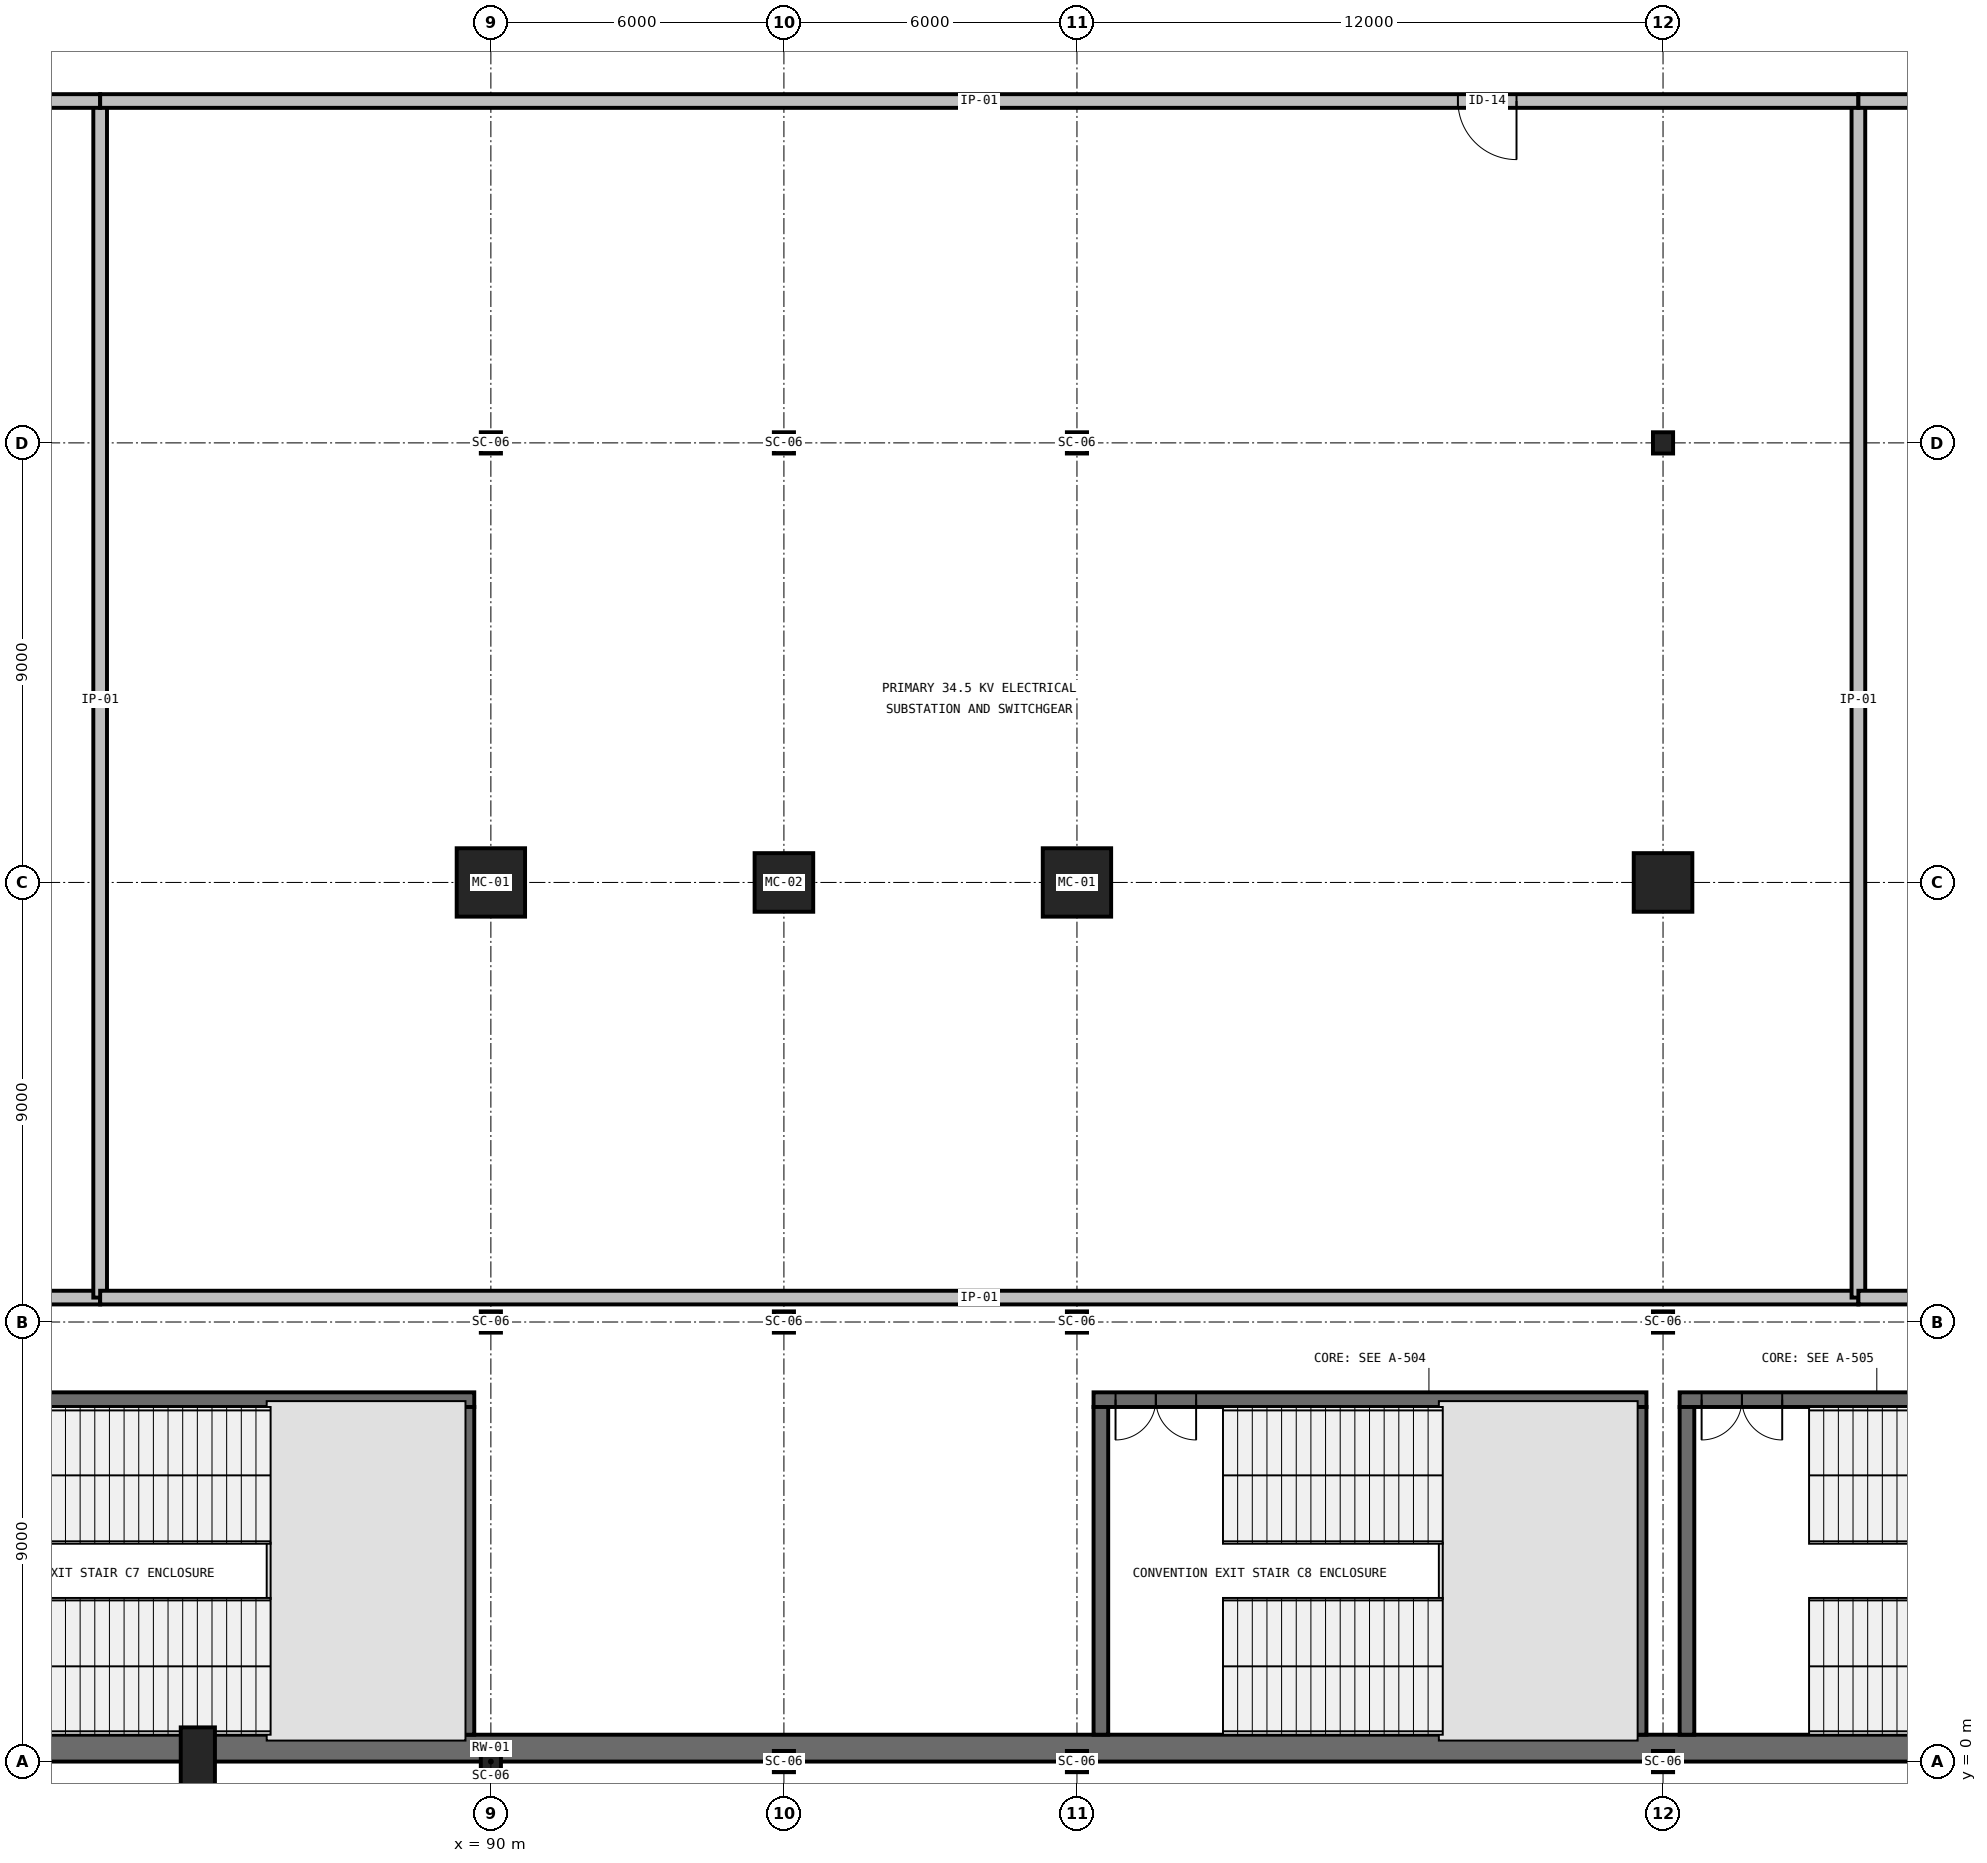
"""IFC4 building model, lengths in metres.
Left out: names, types, materials, properties, quantities, classifications, styles, units other than length and angle.
Written with IfcOpenShell. Run it as: python <this file> out.ifc"""

import sys

from ifc_helpers import new_model, si_unit, direction, frame, frame_2d, origin, origin_2d, place, context, subcontext, project, spatial, rectangle, i_section, extrude, element, fill, save


model = new_model("IFC4")
c1 = context("Model", 3, precision=1e-05, world=origin(), true_north=direction((0.0, 1.0)))
c2 = subcontext(c1, "Body", "Model", "MODEL_VIEW")
j1 = project(units=[si_unit("LENGTHUNIT", "METRE"), si_unit("PLANEANGLEUNIT", "RADIAN")], contexts=[c1])
p1 = place(None, origin())
s1 = spatial("IfcSite", under=j1, at=p1, CompositionType="ELEMENT")
p2 = place(p1, origin())
s2 = spatial("IfcBuilding", under=s1, at=p2, CompositionType="ELEMENT")
p3 = place(p2, frame((0.0, 0.0, -5.4)))
s3 = spatial("IfcBuildingStorey", under=s2, at=p3, CompositionType="ELEMENT", Elevation=-5.4)
for number, where, z_axis, x_axis in (
    (1, (90.0, 0.0, 0.0), (0.0, 0.0, 1.0), (1.0, 0.0, 0.0)),
    (2, (90.0, 9.0, 0.0), (0.0, 0.0, 1.0), (1.0, 0.0, 0.0)),
):
    element("IfcColumn", number, at=place(p3, frame(where, z_axis=z_axis, x_axis=x_axis)), inside=s3, PredefinedType="COLUMN", context=c2, shape_type="SweptSolid", body=[
        extrude(i_section(OverallWidth=0.412, OverallDepth=0.435, WebThickness=0.036, FlangeThickness=0.057, FilletRadius=0.031, at=origin_2d()), origin(), (0.0, 0.0, 1.0), 5.4),
    ])
p4 = place(p3, frame((90.0, 18.0, 0.0), z_axis=(0.0, 0.0, 1.0), x_axis=(1.0, 0.0, 0.0)))
e3 = element("IfcColumn", 3, at=p4, inside=s3, PredefinedType="COLUMN", context=c2, shape_type="SweptSolid", body=[
    extrude(rectangle(XDim=1.4, YDim=1.4, at=origin_2d()), origin(), (0.0, 0.0, 1.0), 5.4),
])
for number, where, z_axis, x_axis in (
    (4, (90.0, 27.0, 0.0), (0.0, 0.0, 1.0), (1.0, 0.0, 0.0)),
    (5, (96.0, 0.0, 0.0), (0.0, 0.0, 1.0), (1.0, 0.0, 0.0)),
    (6, (96.0, 9.0, 0.0), (0.0, 0.0, 1.0), (1.0, 0.0, 0.0)),
):
    element("IfcColumn", number, at=place(p3, frame(where, z_axis=z_axis, x_axis=x_axis)), inside=s3, PredefinedType="COLUMN", context=c2, shape_type="SweptSolid", body=[
        extrude(i_section(OverallWidth=0.412, OverallDepth=0.435, WebThickness=0.036, FlangeThickness=0.057, FilletRadius=0.031, at=origin_2d()), origin(), (0.0, 0.0, 1.0), 5.4),
    ])
p5 = place(p3, frame((96.0, 18.0, 0.0), z_axis=(0.0, 0.0, 1.0), x_axis=(1.0, 0.0, 0.0)))
e7 = element("IfcColumn", 7, at=p5, inside=s3, PredefinedType="COLUMN", context=c2, shape_type="SweptSolid", body=[
    extrude(rectangle(XDim=1.2, YDim=1.2, at=origin_2d()), origin(), (0.0, 0.0, 1.0), 5.4),
])
for number, where, z_axis, x_axis in (
    (8, (96.0, 27.0, 0.0), (0.0, 0.0, 1.0), (1.0, 0.0, 0.0)),
    (9, (102.0, 0.0, 0.0), (0.0, 0.0, 1.0), (1.0, 0.0, 0.0)),
    (10, (102.0, 9.0, 0.0), (0.0, 0.0, 1.0), (1.0, 0.0, 0.0)),
):
    element("IfcColumn", number, at=place(p3, frame(where, z_axis=z_axis, x_axis=x_axis)), inside=s3, PredefinedType="COLUMN", context=c2, shape_type="SweptSolid", body=[
        extrude(i_section(OverallWidth=0.412, OverallDepth=0.435, WebThickness=0.036, FlangeThickness=0.057, FilletRadius=0.031, at=origin_2d()), origin(), (0.0, 0.0, 1.0), 5.4),
    ])
p6 = place(p3, frame((102.0, 18.0, 0.0), z_axis=(0.0, 0.0, 1.0), x_axis=(1.0, 0.0, 0.0)))
e11 = element("IfcColumn", 11, at=p6, inside=s3, PredefinedType="COLUMN", context=c2, shape_type="SweptSolid", body=[
    extrude(rectangle(XDim=1.4, YDim=1.4, at=origin_2d()), origin(), (0.0, 0.0, 1.0), 5.4),
])
for number, where, z_axis, x_axis in (
    (12, (102.0, 27.0, 0.0), (0.0, 0.0, 1.0), (1.0, 0.0, 0.0)),
    (13, (114.0, 0.0, 0.0), (0.0, 0.0, 1.0), (1.0, 0.0, 0.0)),
    (14, (114.0, 9.0, 0.0), (0.0, 0.0, 1.0), (1.0, 0.0, 0.0)),
):
    element("IfcColumn", number, at=place(p3, frame(where, z_axis=z_axis, x_axis=x_axis)), inside=s3, PredefinedType="COLUMN", context=c2, shape_type="SweptSolid", body=[
        extrude(i_section(OverallWidth=0.412, OverallDepth=0.435, WebThickness=0.036, FlangeThickness=0.057, FilletRadius=0.031, at=origin_2d()), origin(), (0.0, 0.0, 1.0), 5.4),
    ])
p7 = place(p3, frame((114.0, 18.0, 0.0), z_axis=(0.0, 0.0, 1.0), x_axis=(1.0, 0.0, 0.0)))
e15 = element("IfcColumn", 15, at=p7, inside=s3, PredefinedType="COLUMN", context=c2, shape_type="SweptSolid", body=[
    extrude(rectangle(XDim=1.2, YDim=1.2, at=origin_2d()), origin(), (0.0, 0.0, 1.0), 5.4),
])
p8 = place(p3, frame((114.0, 27.0, 0.0), z_axis=(0.0, 0.0, 1.0), x_axis=(1.0, 0.0, 0.0)))
e16 = element("IfcColumn", 16, at=p8, inside=s3, PredefinedType="COLUMN", context=c2, shape_type="SweptSolid", body=[
    extrude(i_section(OverallWidth=0.412, OverallDepth=0.435, WebThickness=0.036, FlangeThickness=0.057, FilletRadius=0.031, at=origin_2d()), origin(), (0.0, 0.0, 1.0), 5.4),
])
p9 = place(p3, frame((84.0, 0.0, 0.0), z_axis=(0.0, 0.0, 1.0), x_axis=(1.0, 0.0, 0.0)))
e17 = element("IfcColumn", 17, at=p9, inside=s3, PredefinedType="PILASTER", context=c2, shape_type="SweptSolid", body=[
    extrude(rectangle(XDim=0.7, YDim=1.4, at=origin_2d()), origin(), (0.0, 0.0, 1.0), 5.4),
])
p10 = place(p3, frame((0.0, 0.275, 0.0), z_axis=(0.0, 0.0, 1.0), x_axis=(1.0, 0.0, 0.0)))
e18 = element("IfcWall", 18, at=p10, inside=s3, PredefinedType="SOLIDWALL", context=c2, shape_type="SweptSolid", body=[
    extrude(rectangle(XDim=174.0, YDim=0.55, at=frame_2d((87.0, 0.0))), origin(), (0.0, 0.0, 1.0), 5.02),
])
p11 = place(p3, frame((89.66, 7.41, 0.0), z_axis=(0.0, 0.0, 1.0), x_axis=(-1.0, 0.0, 0.0)))
e19 = element("IfcWall", 19, at=p11, inside=s3, PredefinedType="SHEAR", context=c2, shape_type="SweptSolid", body=[
    extrude(rectangle(XDim=11.32, YDim=0.3, at=frame_2d((5.66, 0.0))), origin(), (0.0, 0.0, 1.0), 5.4),
])
p12 = place(p11, frame((9.22, 0.0, 0.0)))
e20 = element("IfcOpeningElement", 20, at=p12, cuts=e19, PredefinedType="OPENING", context=c2, shape_type="SweptSolid", body=[
    extrude(rectangle(XDim=1.65, YDim=2.25, at=frame_2d((0.825, 1.125))), frame((0.0, 0.165, 0.0), z_axis=(0.0, -1.0, 0.0), x_axis=(1.0, 0.0, 0.0)), (0.0, 0.0, 1.0), 0.33),
])
p13 = place(p3, frame((89.51, 0.55, 0.0), z_axis=(0.0, 0.0, 1.0), x_axis=(0.0, 1.0, 0.0)))
e21 = element("IfcWall", 21, at=p13, inside=s3, PredefinedType="SHEAR", context=c2, shape_type="SweptSolid", body=[
    extrude(rectangle(XDim=6.71, YDim=0.3, at=frame_2d((3.355, 0.0))), origin(), (0.0, 0.0, 1.0), 5.4),
])
p14 = place(p3, frame((113.66, 7.41, 0.0), z_axis=(0.0, 0.0, 1.0), x_axis=(-1.0, 0.0, 0.0)))
e22 = element("IfcWall", 22, at=p14, inside=s3, PredefinedType="SHEAR", context=c2, shape_type="SweptSolid", body=[
    extrude(rectangle(XDim=11.32, YDim=0.3, at=frame_2d((5.66, 0.0))), origin(), (0.0, 0.0, 1.0), 5.4),
])
p15 = place(p14, frame((9.22, 0.0, 0.0)))
e23 = element("IfcOpeningElement", 23, at=p15, cuts=e22, PredefinedType="OPENING", context=c2, shape_type="SweptSolid", body=[
    extrude(rectangle(XDim=1.65, YDim=2.25, at=frame_2d((0.825, 1.125))), frame((0.0, 0.165, 0.0), z_axis=(0.0, -1.0, 0.0), x_axis=(1.0, 0.0, 0.0)), (0.0, 0.0, 1.0), 0.33),
])
for number, where, z_axis, x_axis in (
    (24, (102.49, 7.26, 0.0), (0.0, 0.0, 1.0), (0.0, -1.0, 0.0)),
    (25, (113.51, 0.55, 0.0), (0.0, 0.0, 1.0), (0.0, 1.0, 0.0)),
):
    element("IfcWall", number, at=place(p3, frame(where, z_axis=z_axis, x_axis=x_axis)), inside=s3, PredefinedType="SHEAR", context=c2, shape_type="SweptSolid", body=[
        extrude(rectangle(XDim=6.71, YDim=0.3, at=frame_2d((3.355, 0.0))), origin(), (0.0, 0.0, 1.0), 5.4),
    ])
p16 = place(p3, frame((125.66, 7.41, 0.0), z_axis=(0.0, 0.0, 1.0), x_axis=(-1.0, 0.0, 0.0)))
e26 = element("IfcWall", 26, at=p16, inside=s3, PredefinedType="SHEAR", context=c2, shape_type="SweptSolid", body=[
    extrude(rectangle(XDim=11.32, YDim=0.3, at=frame_2d((5.66, 0.0))), origin(), (0.0, 0.0, 1.0), 5.4),
])
p17 = place(p16, frame((9.22, 0.0, 0.0)))
e27 = element("IfcOpeningElement", 27, at=p17, cuts=e26, PredefinedType="OPENING", context=c2, shape_type="SweptSolid", body=[
    extrude(rectangle(XDim=1.65, YDim=2.25, at=frame_2d((0.825, 1.125))), frame((0.0, 0.165, 0.0), z_axis=(0.0, -1.0, 0.0), x_axis=(1.0, 0.0, 0.0)), (0.0, 0.0, 1.0), 0.33),
])
p18 = place(p3, frame((114.49, 7.26, 0.0), z_axis=(0.0, 0.0, 1.0), x_axis=(0.0, -1.0, 0.0)))
e28 = element("IfcWall", 28, at=p18, inside=s3, PredefinedType="SHEAR", context=c2, shape_type="SweptSolid", body=[
    extrude(rectangle(XDim=6.71, YDim=0.3, at=frame_2d((3.355, 0.0))), origin(), (0.0, 0.0, 1.0), 5.4),
])
p19 = place(p3, frame((46.0, 9.5, 0.0), z_axis=(0.0, 0.0, 1.0), x_axis=(1.0, 0.0, 0.0)))
e29 = element("IfcWall", 29, at=p19, inside=s3, PredefinedType="PARTITIONING", context=c2, shape_type="SweptSolid", body=[
    extrude(rectangle(XDim=36.0, YDim=0.28, at=frame_2d((18.0, 0.0))), origin(), (0.0, 0.0, 1.0), 4.96),
])
p20 = place(p3, frame((82.0, 9.5, 0.0), z_axis=(0.0, 0.0, 1.0), x_axis=(0.0, 1.0, 0.0)))
e30 = element("IfcWall", 30, at=p20, inside=s3, PredefinedType="PARTITIONING", context=c2, shape_type="SweptSolid", body=[
    extrude(rectangle(XDim=24.5, YDim=0.28, at=frame_2d((12.25, 0.0))), origin(), (0.0, 0.0, 1.0), 4.96),
])
p21 = place(p3, frame((82.0, 34.0, 0.0), z_axis=(0.0, 0.0, 1.0), x_axis=(-1.0, 0.0, 0.0)))
e31 = element("IfcWall", 31, at=p21, inside=s3, PredefinedType="PARTITIONING", context=c2, shape_type="SweptSolid", body=[
    extrude(rectangle(XDim=36.0, YDim=0.28, at=frame_2d((18.0, 0.0))), origin(), (0.0, 0.0, 1.0), 4.96),
])
p22 = place(p21, frame((7.0, 0.0, 0.0)))
e32 = element("IfcOpeningElement", 32, at=p22, cuts=e31, PredefinedType="OPENING", context=c2, shape_type="SweptSolid", body=[
    extrude(rectangle(XDim=1.2, YDim=2.2, at=frame_2d((0.6, 1.1))), frame((0.0, 0.155, 0.0), z_axis=(0.0, -1.0, 0.0), x_axis=(1.0, 0.0, 0.0)), (0.0, 0.0, 1.0), 0.31),
])
p23 = place(p3, frame((82.0, 9.5, 0.0), z_axis=(0.0, 0.0, 1.0), x_axis=(1.0, 0.0, 0.0)))
e33 = element("IfcWall", 33, at=p23, inside=s3, PredefinedType="PARTITIONING", context=c2, shape_type="SweptSolid", body=[
    extrude(rectangle(XDim=36.0, YDim=0.28, at=frame_2d((18.0, 0.0))), origin(), (0.0, 0.0, 1.0), 4.96),
])
p24 = place(p3, frame((118.0, 9.5, 0.0), z_axis=(0.0, 0.0, 1.0), x_axis=(0.0, 1.0, 0.0)))
e34 = element("IfcWall", 34, at=p24, inside=s3, PredefinedType="PARTITIONING", context=c2, shape_type="SweptSolid", body=[
    extrude(rectangle(XDim=24.5, YDim=0.28, at=frame_2d((12.25, 0.0))), origin(), (0.0, 0.0, 1.0), 4.96),
])
p25 = place(p3, frame((118.0, 34.0, 0.0), z_axis=(0.0, 0.0, 1.0), x_axis=(-1.0, 0.0, 0.0)))
e35 = element("IfcWall", 35, at=p25, inside=s3, PredefinedType="PARTITIONING", context=c2, shape_type="SweptSolid", body=[
    extrude(rectangle(XDim=36.0, YDim=0.28, at=frame_2d((18.0, 0.0))), origin(), (0.0, 0.0, 1.0), 4.96),
])
p26 = place(p25, frame((7.0, 0.0, 0.0)))
e36 = element("IfcOpeningElement", 36, at=p26, cuts=e35, PredefinedType="OPENING", context=c2, shape_type="SweptSolid", body=[
    extrude(rectangle(XDim=1.2, YDim=2.2, at=frame_2d((0.6, 1.1))), frame((0.0, 0.155, 0.0), z_axis=(0.0, -1.0, 0.0), x_axis=(1.0, 0.0, 0.0)), (0.0, 0.0, 1.0), 0.31),
])
p27 = place(p3, frame((118.0, 9.5, 0.0), z_axis=(0.0, 0.0, 1.0), x_axis=(1.0, 0.0, 0.0)))
e37 = element("IfcWall", 37, at=p27, inside=s3, PredefinedType="PARTITIONING", context=c2, shape_type="SweptSolid", body=[
    extrude(rectangle(XDim=32.0, YDim=0.28, at=frame_2d((16.0, 0.0))), origin(), (0.0, 0.0, 1.0), 4.96),
])
p28 = place(p3, frame((150.0, 34.0, 0.0), z_axis=(0.0, 0.0, 1.0), x_axis=(-1.0, 0.0, 0.0)))
e38 = element("IfcWall", 38, at=p28, inside=s3, PredefinedType="PARTITIONING", context=c2, shape_type="SweptSolid", body=[
    extrude(rectangle(XDim=32.0, YDim=0.28, at=frame_2d((16.0, 0.0))), origin(), (0.0, 0.0, 1.0), 4.96),
])
p29 = place(p28, frame((7.0, 0.0, 0.0)))
e39 = element("IfcOpeningElement", 39, at=p29, cuts=e38, PredefinedType="OPENING", context=c2, shape_type="SweptSolid", body=[
    extrude(rectangle(XDim=1.2, YDim=2.2, at=frame_2d((0.6, 1.1))), frame((0.0, 0.155, 0.0), z_axis=(0.0, -1.0, 0.0), x_axis=(1.0, 0.0, 0.0)), (0.0, 0.0, 1.0), 0.31),
])
p30 = place(p15, origin())
e40 = element("IfcDoor", 40, at=p30, inside=s3, OperationType="DOUBLE_DOOR_SINGLE_SWING", PredefinedType="DOOR", context=c2, shape_type="SweptSolid", body=[
    extrude(rectangle(XDim=1.65, YDim=2.25, at=frame_2d((0.825, 1.125))), frame((0.0, 0.025, 0.0), z_axis=(0.0, -1.0, 0.0), x_axis=(1.0, 0.0, 0.0)), (0.0, 0.0, 1.0), 0.05),
])
fill(e23, e40)
p31 = place(p17, origin())
e41 = element("IfcDoor", 41, at=p31, inside=s3, OperationType="DOUBLE_DOOR_SINGLE_SWING", PredefinedType="DOOR", context=c2, shape_type="SweptSolid", body=[
    extrude(rectangle(XDim=1.65, YDim=2.25, at=frame_2d((0.825, 1.125))), frame((0.0, 0.025, 0.0), z_axis=(0.0, -1.0, 0.0), x_axis=(1.0, 0.0, 0.0)), (0.0, 0.0, 1.0), 0.05),
])
fill(e27, e41)
p32 = place(p26, origin())
e42 = element("IfcDoor", 42, at=p32, inside=s3, OperationType="SINGLE_SWING_LEFT", PredefinedType="DOOR", context=c2, shape_type="SweptSolid", body=[
    extrude(rectangle(XDim=1.2, YDim=2.2, at=frame_2d((0.6, 1.1))), frame((0.0, 0.025, 0.0), z_axis=(0.0, -1.0, 0.0), x_axis=(1.0, 0.0, 0.0)), (0.0, 0.0, 1.0), 0.05),
])
fill(e36, e42)
save(model, sys.argv[1])
